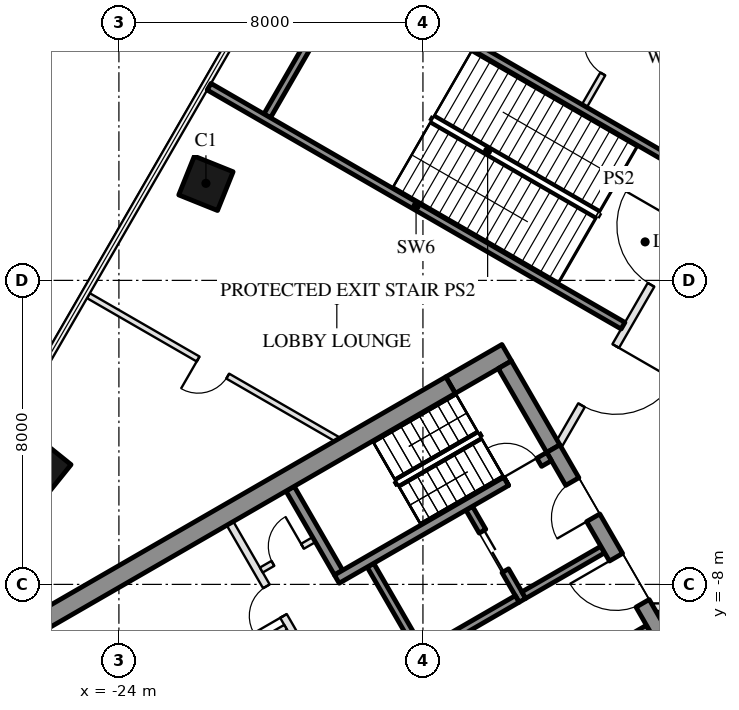
"""IFC4 building model, lengths in metres.
Left out: names, types, materials, properties, quantities, classifications, styles, units other than length and angle.
Written with IfcOpenShell. Run it as: python <this file> out.ifc"""

import sys

from ifc_helpers import new_model, si_unit, direction, frame, frame_2d, origin, origin_2d, place, context, subcontext, project, spatial, rectangle, hollow_rectangle, extrude, boolean, halfspace, element, fill, save


model = new_model("IFC4")
c1 = context("Model", 3, precision=1e-05, world=origin(), true_north=direction((0.0, 1.0)))
c2 = subcontext(c1, "Body", "Model", "MODEL_VIEW")
j1 = project(units=[si_unit("LENGTHUNIT", "METRE"), si_unit("PLANEANGLEUNIT", "RADIAN")], contexts=[c1])
p1 = place(None, origin())
s1 = spatial("IfcSite", under=j1, at=p1, CompositionType="ELEMENT")
p2 = place(p1, origin())
s2 = spatial("IfcBuilding", under=s1, at=p2, CompositionType="ELEMENT")
p3 = place(p2, frame((0.0, 0.0, 9.0)))
s3 = spatial("IfcBuildingStorey", under=s2, at=p3, CompositionType="ELEMENT", Elevation=9.0)
p4 = place(p3, frame((-21.71, 2.553, 0.0), z_axis=(0.12170363311, -0.017295707738, 0.992415781909), x_axis=(-0.497292845598, -0.86636846087, 0.045885899002)))
e1 = element("IfcColumn", 1, at=p4, inside=s3, PredefinedType="COLUMN", context=c2, shape_type="SweptSolid", body=[
    boolean("DIFFERENCE", boolean("DIFFERENCE", extrude(hollow_rectangle(XDim=1.1, YDim=1.1, WallThickness=0.05, at=origin_2d()), origin(), (0.0, 0.0, 1.0), 6.55), halfspace(frame((0.0, 0.0, 0.017), z_axis=(0.0, 0.0, 1.0), x_axis=(1.0, 0.0, 0.0)), True)), halfspace(frame((0.0, 0.0, 6.534), z_axis=(0.0, 0.0, 1.0), x_axis=(1.0, 0.0, 0.0)), False)),
])
p5 = place(p3, frame((-26.032, -4.932, 0.0), z_axis=(0.144210024077, 0.022406246977, 0.989293398872), x_axis=(-0.493357756794, -0.864999630049, 0.091508271899)))
e2 = element("IfcColumn", 2, at=p5, inside=s3, PredefinedType="COLUMN", context=c2, shape_type="SweptSolid", body=[
    boolean("DIFFERENCE", boolean("DIFFERENCE", extrude(hollow_rectangle(XDim=1.1, YDim=1.1, WallThickness=0.05, at=origin_2d()), origin(), (0.0, 0.0, 1.0), 6.57), halfspace(frame((0.0, 0.0, 0.019), z_axis=(0.0, 0.0, 1.0), x_axis=(1.0, 0.0, 0.0)), True)), halfspace(frame((0.0, 0.0, 6.552), z_axis=(0.0, 0.0, 1.0), x_axis=(1.0, 0.0, 0.0)), False)),
])
p6 = place(p3, frame((-19.496, -5.482, 0.0), z_axis=(0.0, 0.0, 1.0), x_axis=(0.499990435942, -0.866030925526, 0.0)))
e3 = element("IfcWall", 3, at=p6, inside=s3, PredefinedType="SHEAR", context=c2, shape_type="SweptSolid", body=[
    extrude(rectangle(XDim=2.55, YDim=0.25, at=frame_2d((1.275, 0.0))), origin(), (0.0, 0.0, 1.0), 6.15),
])
p7 = place(p3, frame((-17.381, -7.495, 0.0), z_axis=(0.0, 0.0, 1.0), x_axis=(0.500011755427, -0.866018616679, 0.0)))
e4 = element("IfcWall", 4, at=p7, inside=s3, PredefinedType="SHEAR", context=c2, shape_type="SweptSolid", body=[
    extrude(rectangle(XDim=2.8, YDim=0.2, at=frame_2d((1.4, 0.0))), origin(), (0.0, 0.0, 1.0), 6.15),
])
p8 = place(p3, frame((-14.783, -5.995, 0.0), z_axis=(0.0, 0.0, 1.0), x_axis=(0.49994636267, -0.866056369097, 0.0)))
e5 = element("IfcWall", 5, at=p8, inside=s3, PredefinedType="SHEAR", context=c2, shape_type="SweptSolid", body=[
    extrude(rectangle(XDim=2.8, YDim=0.2, at=frame_2d((1.4, 0.0))), origin(), (0.0, 0.0, 1.0), 6.15),
])
p9 = place(p8, frame((0.7, 0.0, 0.0)))
e6 = element("IfcOpeningElement", 6, at=p9, cuts=e5, PredefinedType="OPENING", context=c2, shape_type="SweptSolid", body=[
    extrude(rectangle(XDim=1.2, YDim=2.1, at=frame_2d((0.6, 1.05))), frame((0.0, 0.11, 0.0), z_axis=(0.0, -1.0, 0.0), x_axis=(1.0, 0.0, 0.0)), (0.0, 0.0, 1.0), 0.22),
])
p10 = place(p3, frame((-13.52, -8.383, 0.0), z_axis=(0.0, 0.0, 1.0), x_axis=(-0.866034573852, -0.49998411664, 0.0)))
e7 = element("IfcWall", 7, at=p10, inside=s3, PredefinedType="SHEAR", context=c2, shape_type="SweptSolid", body=[
    extrude(rectangle(XDim=2.8, YDim=0.2, at=frame_2d((1.4, 0.0))), origin(), (0.0, 0.0, 1.0), 6.15),
])
p11 = place(p3, frame((-11.268, -7.083, 0.0), z_axis=(0.0, 0.0, 1.0), x_axis=(-0.866050077142, -0.499957262057, 0.0)))
e8 = element("IfcWall", 8, at=p11, inside=s3, PredefinedType="SHEAR", context=c2, shape_type="SweptSolid", body=[
    extrude(rectangle(XDim=2.4, YDim=0.2, at=frame_2d((1.2, 0.0))), origin(), (0.0, 0.0, 1.0), 6.15),
])
p12 = place(p3, frame((-10.068, -9.162, 0.0), z_axis=(0.0, 0.0, 1.0), x_axis=(-0.866032725843, -0.499987317609, 0.0)))
e9 = element("IfcWall", 9, at=p12, inside=s3, PredefinedType="SHEAR", context=c2, shape_type="SweptSolid", body=[
    extrude(rectangle(XDim=10.16, YDim=0.2, at=frame_2d((5.08, 0.0))), origin(), (0.0, 0.0, 1.0), 6.15),
])
p13 = place(p12, frame((0.72, 0.0, 0.0)))
e10 = element("IfcOpeningElement", 10, at=p13, cuts=e9, PredefinedType="OPENING", context=c2, shape_type="SweptSolid", body=[
    extrude(rectangle(XDim=0.9, YDim=2.1, at=frame_2d((0.45, 1.05))), frame((0.0, 0.11, 0.0), z_axis=(0.0, -1.0, 0.0), x_axis=(1.0, 0.0, 0.0)), (0.0, 0.0, 1.0), 0.22),
])
p14 = place(p12, frame((5.8, 0.0, 0.0)))
e11 = element("IfcOpeningElement", 11, at=p14, cuts=e9, PredefinedType="OPENING", context=c2, shape_type="SweptSolid", body=[
    extrude(rectangle(XDim=0.9, YDim=2.1, at=frame_2d((0.45, 1.05))), frame((0.0, 0.11, 0.0), z_axis=(0.0, -1.0, 0.0), x_axis=(1.0, 0.0, 0.0)), (0.0, 0.0, 1.0), 0.22),
])
p15 = place(p3, frame((-21.076, -6.395, 0.0), z_axis=(0.0, 0.0, 1.0), x_axis=(0.50001468107, -0.866016927499, 0.0)))
e12 = element("IfcWall", 12, at=p15, inside=s3, PredefinedType="PARTITIONING", context=c2, shape_type="SweptSolid", body=[
    extrude(rectangle(XDim=5.4, YDim=0.2, at=frame_2d((2.7, 0.0))), origin(), (0.0, 0.0, 1.0), 6.15),
])
p16 = place(p15, frame((1.913, 0.0, 0.0)))
e13 = element("IfcOpeningElement", 13, at=p16, cuts=e12, PredefinedType="OPENING", context=c2, shape_type="SweptSolid", body=[
    extrude(rectangle(XDim=0.9, YDim=2.1, at=frame_2d((0.45, 1.05))), frame((0.0, 0.11, 0.0), z_axis=(0.0, -1.0, 0.0), x_axis=(1.0, 0.0, 0.0)), (0.0, 0.0, 1.0), 0.22),
])
p17 = place(p15, frame((3.788, 0.0, 0.0)))
e14 = element("IfcOpeningElement", 14, at=p17, cuts=e12, PredefinedType="OPENING", context=c2, shape_type="SweptSolid", body=[
    extrude(rectangle(XDim=0.9, YDim=2.1, at=frame_2d((0.45, 1.05))), frame((0.0, 0.11, 0.0), z_axis=(0.0, -1.0, 0.0), x_axis=(1.0, 0.0, 0.0)), (0.0, 0.0, 1.0), 0.22),
])
p18 = place(p3, frame((-18.866, -6.822, 0.0), z_axis=(0.0, 0.0, 1.0), x_axis=(-0.866028054938, -0.499995408039, 0.0)))
e15 = element("IfcWall", 15, at=p18, inside=s3, PredefinedType="PARTITIONING", context=c2, shape_type="SweptSolid", body=[
    extrude(rectangle(XDim=1.6, YDim=0.15, at=frame_2d((0.8, 0.0))), origin(), (0.0, 0.0, 1.0), 6.15),
])
p19 = place(p18, frame((0.35, 0.0, 0.0)))
e16 = element("IfcOpeningElement", 16, at=p19, cuts=e15, PredefinedType="OPENING", context=c2, shape_type="SweptSolid", body=[
    extrude(rectangle(XDim=0.9, YDim=2.1, at=frame_2d((0.45, 1.05))), frame((0.0, 0.085, 0.0), z_axis=(0.0, -1.0, 0.0), x_axis=(1.0, 0.0, 0.0)), (0.0, 0.0, 1.0), 0.17),
])
p20 = place(p3, frame((-19.613, -9.13, 0.0), z_axis=(0.0, 0.0, 1.0), x_axis=(-0.866037242061, -0.499979494943, 0.0)))
e17 = element("IfcWall", 17, at=p20, inside=s3, PredefinedType="PARTITIONING", context=c2, shape_type="SweptSolid", body=[
    extrude(rectangle(XDim=6.55, YDim=0.15, at=frame_2d((3.275, 0.0))), origin(), (0.0, 0.0, 1.0), 6.15),
])
p21 = place(p3, frame((-13.797, -1.903, 0.0), z_axis=(0.0, 0.0, 1.0), x_axis=(-0.866033076574, -0.499986710104, 0.0)))
e18 = element("IfcWall", 18, at=p21, inside=s3, PredefinedType="SHEAR", context=c2, shape_type="SweptSolid", body=[
    extrude(rectangle(XDim=1.706, YDim=0.5, at=frame_2d((0.853, 0.0))), origin(), (0.0, 0.0, 1.0), 6.15),
])
p22 = place(p3, frame((-15.274, -2.756, 0.0), z_axis=(0.0, 0.0, 1.0), x_axis=(-0.86602318214, -0.500003847982, 0.0)))
e19 = element("IfcWall", 19, at=p22, inside=s3, PredefinedType="SHEAR", context=c2, shape_type="SweptSolid", body=[
    extrude(rectangle(XDim=13.894, YDim=0.5, at=frame_2d((6.947, 0.0))), origin(), (0.0, 0.0, 1.0), 6.15),
])
p23 = place(p3, frame((-13.845, -2.22, 0.0), z_axis=(0.0, 0.0, 1.0), x_axis=(0.500062241894, -0.865989465428, 0.0)))
e20 = element("IfcWall", 20, at=p23, inside=s3, PredefinedType="SHEAR", context=c2, shape_type="SweptSolid", body=[
    extrude(rectangle(XDim=2.55, YDim=0.4, at=frame_2d((1.275, 0.0))), origin(), (0.0, 0.0, 1.0), 6.15),
])
p24 = place(p3, frame((-12.57, -4.428, 0.0), z_axis=(0.0, 0.0, 1.0), x_axis=(0.499984378957, -0.86603442241, 0.0)))
e21 = element("IfcWall", 21, at=p24, inside=s3, PredefinedType="SHEAR", context=c2, shape_type="SweptSolid", body=[
    extrude(rectangle(XDim=7.45, YDim=0.4, at=frame_2d((3.725, 0.0))), origin(), (0.0, 0.0, 1.0), 6.15),
])
p25 = place(p24, frame((1.0, 0.0, 0.0)))
e22 = element("IfcOpeningElement", 22, at=p25, cuts=e21, PredefinedType="OPENING", context=c2, shape_type="SweptSolid", body=[
    extrude(rectangle(XDim=1.1, YDim=2.1, at=frame_2d((0.55, 1.05))), frame((0.0, 0.21, 0.0), z_axis=(0.0, -1.0, 0.0), x_axis=(1.0, 0.0, 0.0)), (0.0, 0.0, 1.0), 0.42),
])
p26 = place(p24, frame((3.3, 0.0, 0.0)))
e23 = element("IfcOpeningElement", 23, at=p26, cuts=e21, PredefinedType="OPENING", context=c2, shape_type="SweptSolid", body=[
    extrude(rectangle(XDim=1.4, YDim=2.1, at=frame_2d((0.7, 1.05))), frame((0.0, 0.21, 0.0), z_axis=(0.0, -1.0, 0.0), x_axis=(1.0, 0.0, 0.0)), (0.0, 0.0, 1.0), 0.42),
])
p27 = place(p3, frame((-12.681, -4.636, 0.0), z_axis=(0.0, 0.0, 1.0), x_axis=(-0.86601437931, -0.500019094464, 0.0)))
e24 = element("IfcWall", 24, at=p27, inside=s3, PredefinedType="SHEAR", context=c2, shape_type="SweptSolid", body=[
    extrude(rectangle(XDim=1.306, YDim=0.25, at=frame_2d((0.653, 0.0))), origin(), (0.0, 0.0, 1.0), 6.15),
])
p28 = place(p27, frame((0.3, 0.0, 0.0)))
e25 = element("IfcOpeningElement", 25, at=p28, cuts=e24, PredefinedType="OPENING", context=c2, shape_type="SweptSolid", body=[
    extrude(rectangle(XDim=1.0, YDim=2.1, at=frame_2d((0.5, 1.05))), frame((0.0, 0.135, 0.0), z_axis=(0.0, -1.0, 0.0), x_axis=(1.0, 0.0, 0.0)), (0.0, 0.0, 1.0), 0.27),
])
p29 = place(p3, frame((-13.812, -5.29, 0.0), z_axis=(0.0, 0.0, 1.0), x_axis=(-0.866023561601, -0.500003190742, 0.0)))
e26 = element("IfcWall", 26, at=p29, inside=s3, PredefinedType="SHEAR", context=c2, shape_type="SweptSolid", body=[
    extrude(rectangle(XDim=5.144, YDim=0.25, at=frame_2d((2.572, 0.0))), origin(), (0.0, 0.0, 1.0), 6.15),
])
p30 = place(p3, frame((-9.93, -8.6, 0.0), z_axis=(0.0, 0.0, 1.0), x_axis=(1.0, 0.0, 0.0)))
e27 = element("IfcWall", 27, at=p30, inside=s3, PredefinedType="PARTITIONING", context=c2, shape_type="SweptSolid", body=[
    extrude(rectangle(XDim=19.861, YDim=0.2, at=frame_2d((9.93, 0.0))), origin(), (0.0, 0.0, 1.0), 5.36),
])
p31 = place(p30, frame((1.234, 0.0, 0.0)))
e28 = element("IfcOpeningElement", 28, at=p31, cuts=e27, PredefinedType="OPENING", context=c2, shape_type="SweptSolid", body=[
    extrude(rectangle(XDim=1.2, YDim=2.1, at=frame_2d((0.6, 1.05))), frame((0.0, 0.11, 0.0), z_axis=(0.0, -1.0, 0.0), x_axis=(1.0, 0.0, 0.0)), (0.0, 0.0, 1.0), 0.22),
])
p32 = place(p30, frame((5.537, 0.0, 0.0)))
e29 = element("IfcOpeningElement", 29, at=p32, cuts=e27, PredefinedType="OPENING", context=c2, shape_type="SweptSolid", body=[
    extrude(rectangle(XDim=1.8, YDim=2.4, at=frame_2d((0.9, 1.2))), frame((0.0, 0.11, 0.0), z_axis=(0.0, -1.0, 0.0), x_axis=(1.0, 0.0, 0.0)), (0.0, 0.0, 1.0), 0.22),
])
p33 = place(p30, frame((11.224, 0.0, 0.0)))
e30 = element("IfcOpeningElement", 30, at=p33, cuts=e27, PredefinedType="OPENING", context=c2, shape_type="SweptSolid", body=[
    extrude(rectangle(XDim=1.8, YDim=2.4, at=frame_2d((0.9, 1.2))), frame((0.0, 0.11, 0.0), z_axis=(0.0, -1.0, 0.0), x_axis=(1.0, 0.0, 0.0)), (0.0, 0.0, 1.0), 0.22),
])
p34 = place(p30, frame((16.877, 0.0, 0.0)))
e31 = element("IfcOpeningElement", 31, at=p34, cuts=e27, PredefinedType="OPENING", context=c2, shape_type="SweptSolid", body=[
    extrude(rectangle(XDim=1.0, YDim=2.1, at=frame_2d((0.5, 1.05))), frame((0.0, 0.11, 0.0), z_axis=(0.0, -1.0, 0.0), x_axis=(1.0, 0.0, 0.0)), (0.0, 0.0, 1.0), 0.22),
])
p35 = place(p3, frame((-17.948, 8.053, 0.0), z_axis=(0.0, 0.0, 1.0), x_axis=(-0.500028799954, -0.866008775485, 0.0)))
e32 = element("IfcWall", 32, at=p35, inside=s3, PredefinedType="SOLIDWALL", context=c2, shape_type="SweptSolid", body=[
    extrude(rectangle(XDim=4.3, YDim=0.2, at=frame_2d((2.15, 0.0))), origin(), (0.0, 0.0, 1.0), 6.15),
])
p36 = place(p3, frame((-7.59, 11.801, 0.0), z_axis=(0.0, 0.0, 1.0), x_axis=(-0.500005920892, -0.866021985329, 0.0)))
e33 = element("IfcWall", 33, at=p36, inside=s3, PredefinedType="PARTITIONING", context=c2, shape_type="SweptSolid", body=[
    extrude(rectangle(XDim=8.325, YDim=0.15, at=frame_2d((4.163, 0.0))), origin(), (0.0, 0.0, 1.0), 5.36),
])
p37 = place(p36, frame((6.354, 0.0, 0.0)))
e34 = element("IfcOpeningElement", 34, at=p37, cuts=e33, PredefinedType="OPENING", context=c2, shape_type="SweptSolid", body=[
    extrude(rectangle(XDim=1.0, YDim=2.1, at=frame_2d((0.5, 1.05))), frame((0.0, 0.085, 0.0), z_axis=(0.0, -1.0, 0.0), x_axis=(1.0, 0.0, 0.0)), (0.0, 0.0, 1.0), 0.17),
])
p38 = place(p36, frame((3.562, 0.0, 0.0)))
e35 = element("IfcOpeningElement", 35, at=p38, cuts=e33, PredefinedType="OPENING", context=c2, shape_type="SweptSolid", body=[
    extrude(rectangle(XDim=0.9, YDim=2.1, at=frame_2d((0.45, 1.05))), frame((0.0, 0.085, 0.0), z_axis=(0.0, -1.0, 0.0), x_axis=(1.0, 0.0, 0.0)), (0.0, 0.0, 1.0), 0.17),
])
p39 = place(p36, frame((0.871, 0.0, 0.0)))
e36 = element("IfcOpeningElement", 36, at=p39, cuts=e33, PredefinedType="OPENING", context=c2, shape_type="SweptSolid", body=[
    extrude(rectangle(XDim=0.9, YDim=2.1, at=frame_2d((0.45, 1.05))), frame((0.0, 0.085, 0.0), z_axis=(0.0, -1.0, 0.0), x_axis=(1.0, 0.0, 0.0)), (0.0, 0.0, 1.0), 0.17),
])
p40 = place(p3, frame((-17.948, 8.053, 0.0), z_axis=(0.0, 0.0, 1.0), x_axis=(0.86602026553, -0.500008899612, 0.0)))
e37 = element("IfcWall", 37, at=p40, inside=s3, PredefinedType="SOLIDWALL", context=c2, shape_type="SweptSolid", body=[
    extrude(rectangle(XDim=10.87, YDim=0.2, at=frame_2d((5.435, 0.0))), origin(), (0.0, 0.0, 1.0), 6.15),
])
p41 = place(p3, frame((-21.628, 5.097, 0.0), z_axis=(0.0, 0.0, 1.0), x_axis=(0.866023652799, -0.500003032783, 0.0)))
e38 = element("IfcWall", 38, at=p41, inside=s3, PredefinedType="SOLIDWALL", context=c2, shape_type="SweptSolid", body=[
    extrude(rectangle(XDim=12.579, YDim=0.2, at=frame_2d((6.289, 0.0))), origin(), (0.0, 0.0, 1.0), 6.15),
])
p42 = place(p3, frame((-24.802, -0.403, 0.0), z_axis=(0.0, 0.0, 1.0), x_axis=(0.866018471794, -0.500012006368, 0.0)))
e39 = element("IfcWall", 39, at=p42, inside=s3, PredefinedType="PARTITIONING", context=c2, shape_type="SweptSolid", body=[
    extrude(rectangle(XDim=7.566, YDim=0.15, at=frame_2d((3.783, 0.0))), origin(), (0.0, 0.0, 1.0), 5.55),
])
p43 = place(p42, frame((3.333, 0.0, 0.0)))
e40 = element("IfcOpeningElement", 40, at=p43, cuts=e39, PredefinedType="OPENING", context=c2, shape_type="SweptSolid", body=[
    extrude(rectangle(XDim=0.9, YDim=2.1, at=frame_2d((0.45, 1.05))), frame((0.0, 0.085, 0.0), z_axis=(0.0, -1.0, 0.0), x_axis=(1.0, 0.0, 0.0)), (0.0, 0.0, 1.0), 0.17),
])
p44 = place(p3, frame((-2.482, 12.9, 0.0), z_axis=(0.0, 0.0, 1.0), x_axis=(-0.50000478328, -0.866022642139, 0.0)))
e41 = element("IfcWall", 41, at=p44, inside=s3, PredefinedType="PARTITIONING", context=c2, shape_type="SweptSolid", body=[
    extrude(rectangle(XDim=19.861, YDim=0.2, at=frame_2d((9.931, 0.0))), origin(), (0.0, 0.0, 1.0), 5.36),
])
p45 = place(p44, frame((13.23, 0.0, 0.0)))
e42 = element("IfcOpeningElement", 42, at=p45, cuts=e41, PredefinedType="OPENING", context=c2, shape_type="SweptSolid", body=[
    extrude(rectangle(XDim=1.8, YDim=2.1, at=frame_2d((0.9, 1.05))), frame((0.0, 0.11, 0.0), z_axis=(0.0, -1.0, 0.0), x_axis=(1.0, 0.0, 0.0)), (0.0, 0.0, 1.0), 0.22),
])
p46 = place(p44, frame((0.984, 0.0, 0.0)))
e43 = element("IfcOpeningElement", 43, at=p46, cuts=e41, PredefinedType="OPENING", context=c2, shape_type="SweptSolid", body=[
    extrude(rectangle(XDim=1.5, YDim=2.1, at=frame_2d((0.75, 1.05))), frame((0.0, 0.11, 0.0), z_axis=(0.0, -1.0, 0.0), x_axis=(1.0, 0.0, 0.0)), (0.0, 0.0, 1.0), 0.22),
])
p47 = place(p44, frame((16.89, 0.0, 0.0)))
e44 = element("IfcOpeningElement", 44, at=p47, cuts=e41, PredefinedType="OPENING", context=c2, shape_type="SweptSolid", body=[
    extrude(rectangle(XDim=1.8, YDim=2.4, at=frame_2d((0.9, 1.2))), frame((0.0, 0.11, 0.0), z_axis=(0.0, -1.0, 0.0), x_axis=(1.0, 0.0, 0.0)), (0.0, 0.0, 1.0), 0.22),
])
p48 = place(p44, frame((7.168, 0.0, 0.0)))
e45 = element("IfcOpeningElement", 45, at=p48, cuts=e41, PredefinedType="OPENING", context=c2, shape_type="SweptSolid", body=[
    extrude(rectangle(XDim=1.0, YDim=2.1, at=frame_2d((0.5, 1.05))), frame((0.0, 0.11, 0.0), z_axis=(0.0, -1.0, 0.0), x_axis=(1.0, 0.0, 0.0)), (0.0, 0.0, 1.0), 0.22),
])
p49 = place(p9, origin())
e46 = element("IfcDoor", 46, at=p49, inside=s3, OperationType="DOUBLE_DOOR_SLIDING", PredefinedType="DOOR", context=c2, shape_type="SweptSolid", body=[
    extrude(rectangle(XDim=1.2, YDim=2.1, at=frame_2d((0.6, 1.05))), frame((0.0, 0.025, 0.0), z_axis=(0.0, -1.0, 0.0), x_axis=(1.0, 0.0, 0.0)), (0.0, 0.0, 1.0), 0.05),
])
fill(e6, e46)
p50 = place(p19, frame((0.9, 0.0, 0.0), z_axis=(0.0, 0.0, 1.0), x_axis=(-1.0, 0.0, 0.0)))
e47 = element("IfcDoor", 47, at=p50, inside=s3, OperationType="SINGLE_SWING_RIGHT", PredefinedType="DOOR", context=c2, shape_type="SweptSolid", body=[
    extrude(rectangle(XDim=0.9, YDim=2.1, at=frame_2d((0.45, 1.05))), frame((0.0, 0.025, 0.0), z_axis=(0.0, -1.0, 0.0), x_axis=(1.0, 0.0, 0.0)), (0.0, 0.0, 1.0), 0.05),
])
fill(e16, e47)
p51 = place(p16, frame((0.9, 0.0, 0.0), z_axis=(0.0, 0.0, 1.0), x_axis=(-1.0, 0.0, 0.0)))
e48 = element("IfcDoor", 48, at=p51, inside=s3, OperationType="SINGLE_SWING_LEFT", PredefinedType="DOOR", context=c2, shape_type="SweptSolid", body=[
    extrude(rectangle(XDim=0.9, YDim=2.1, at=frame_2d((0.45, 1.05))), frame((0.0, 0.025, 0.0), z_axis=(0.0, -1.0, 0.0), x_axis=(1.0, 0.0, 0.0)), (0.0, 0.0, 1.0), 0.05),
])
fill(e13, e48)
p52 = place(p25, frame((1.1, 0.0, 0.0), z_axis=(0.0, 0.0, 1.0), x_axis=(-1.0, 0.0, 0.0)))
e49 = element("IfcDoor", 49, at=p52, inside=s3, OperationType="SINGLE_SWING_LEFT", PredefinedType="DOOR", context=c2, shape_type="SweptSolid", body=[
    extrude(rectangle(XDim=1.1, YDim=2.1, at=frame_2d((0.55, 1.05))), frame((0.0, 0.025, 0.0), z_axis=(0.0, -1.0, 0.0), x_axis=(1.0, 0.0, 0.0)), (0.0, 0.0, 1.0), 0.05),
])
fill(e22, e49)
p53 = place(p26, frame((1.4, 0.0, 0.0), z_axis=(0.0, 0.0, 1.0), x_axis=(-1.0, 0.0, 0.0)))
e50 = element("IfcDoor", 50, at=p53, inside=s3, OperationType="DOUBLE_DOOR_SINGLE_SWING", PredefinedType="DOOR", context=c2, shape_type="SweptSolid", body=[
    extrude(rectangle(XDim=1.4, YDim=2.1, at=frame_2d((0.7, 1.05))), frame((0.0, 0.025, 0.0), z_axis=(0.0, -1.0, 0.0), x_axis=(1.0, 0.0, 0.0)), (0.0, 0.0, 1.0), 0.05),
])
fill(e23, e50)
p54 = place(p28, frame((1.0, 0.0, 0.0), z_axis=(0.0, 0.0, 1.0), x_axis=(-1.0, 0.0, 0.0)))
e51 = element("IfcDoor", 51, at=p54, inside=s3, OperationType="SINGLE_SWING_LEFT", PredefinedType="DOOR", context=c2, shape_type="SweptSolid", body=[
    extrude(rectangle(XDim=1.0, YDim=2.1, at=frame_2d((0.5, 1.05))), frame((0.0, 0.025, 0.0), z_axis=(0.0, -1.0, 0.0), x_axis=(1.0, 0.0, 0.0)), (0.0, 0.0, 1.0), 0.05),
])
fill(e25, e51)
p55 = place(p45, frame((1.8, 0.0, 0.0), z_axis=(0.0, 0.0, 1.0), x_axis=(-1.0, 0.0, 0.0)))
e52 = element("IfcDoor", 52, at=p55, inside=s3, OperationType="DOUBLE_DOOR_SINGLE_SWING", PredefinedType="DOOR", context=c2, shape_type="SweptSolid", body=[
    extrude(rectangle(XDim=1.8, YDim=2.1, at=frame_2d((0.9, 1.05))), frame((0.0, 0.025, 0.0), z_axis=(0.0, -1.0, 0.0), x_axis=(1.0, 0.0, 0.0)), (0.0, 0.0, 1.0), 0.05),
])
fill(e42, e52)
p56 = place(p47, origin())
e53 = element("IfcDoor", 53, at=p56, inside=s3, OperationType="DOUBLE_DOOR_SINGLE_SWING", PredefinedType="DOOR", context=c2, shape_type="SweptSolid", body=[
    extrude(rectangle(XDim=1.8, YDim=2.4, at=frame_2d((0.9, 1.2))), frame((0.0, 0.025, 0.0), z_axis=(0.0, -1.0, 0.0), x_axis=(1.0, 0.0, 0.0)), (0.0, 0.0, 1.0), 0.05),
])
fill(e44, e53)
p57 = place(p43, frame((0.9, 0.0, 0.0), z_axis=(0.0, 0.0, 1.0), x_axis=(-1.0, 0.0, 0.0)))
e54 = element("IfcDoor", 54, at=p57, inside=s3, OperationType="SINGLE_SWING_RIGHT", PredefinedType="DOOR", context=c2, shape_type="SweptSolid", body=[
    extrude(rectangle(XDim=0.9, YDim=2.1, at=frame_2d((0.45, 1.05))), frame((0.0, 0.025, 0.0), z_axis=(0.0, -1.0, 0.0), x_axis=(1.0, 0.0, 0.0)), (0.0, 0.0, 1.0), 0.05),
])
fill(e40, e54)
p58 = place(p37, frame((1.0, 0.0, 0.0), z_axis=(0.0, 0.0, 1.0), x_axis=(-1.0, 0.0, 0.0)))
e55 = element("IfcDoor", 55, at=p58, inside=s3, OperationType="SINGLE_SWING_RIGHT", PredefinedType="DOOR", context=c2, shape_type="SweptSolid", body=[
    extrude(rectangle(XDim=1.0, YDim=2.1, at=frame_2d((0.5, 1.05))), frame((0.0, 0.025, 0.0), z_axis=(0.0, -1.0, 0.0), x_axis=(1.0, 0.0, 0.0)), (0.0, 0.0, 1.0), 0.05),
])
fill(e34, e55)
save(model, sys.argv[1])
